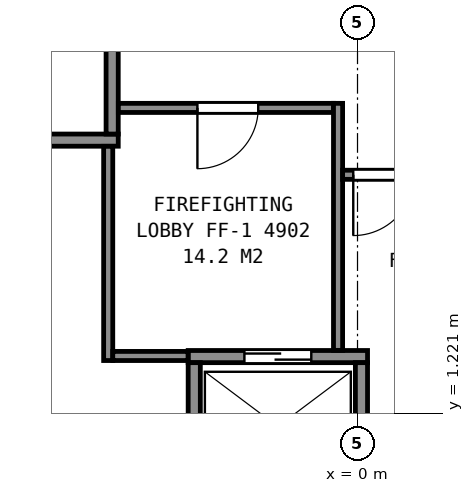
"""IFC4 building model, lengths in metres.
Left out: names, types, materials, properties, quantities, classifications, styles, units other than length and angle.
Written with IfcOpenShell. Run it as: python <this file> out.ifc"""

import sys

from ifc_helpers import new_model, si_unit, direction, frame, frame_2d, origin, place, context, subcontext, project, spatial, rectangle, extrude, element, fill, save


model = new_model("IFC4")
c1 = context("Model", 3, precision=1e-05, world=origin(), true_north=direction((0.0, 1.0)))
c2 = subcontext(c1, "Body", "Model", "MODEL_VIEW")
j1 = project(units=[si_unit("LENGTHUNIT", "METRE"), si_unit("PLANEANGLEUNIT", "RADIAN")], contexts=[c1])
p1 = place(None, origin())
s1 = spatial("IfcSite", under=j1, at=p1, CompositionType="ELEMENT")
p2 = place(p1, origin())
s2 = spatial("IfcBuilding", under=s1, at=p2, CompositionType="ELEMENT")
p3 = place(p2, frame((0.0, 0.0, 196.9)))
s3 = spatial("IfcBuildingStorey", under=s2, at=p3, CompositionType="ELEMENT", Elevation=196.9)
p4 = place(p3, frame((-2.785, 2.15, 0.0), z_axis=(0.0, 0.0, 1.0), x_axis=(1.0, 0.0, 0.0)))
e1 = element("IfcWall", 1, at=p4, inside=s3, PredefinedType="PARTITIONING", context=c2, shape_type="SweptSolid", body=[
    extrude(rectangle(XDim=2.95, YDim=0.2, at=frame_2d((1.475, 0.0))), origin(), (0.0, 0.0, 1.0), 3.7),
])
p5 = place(p4, frame((0.925, 0.0, 0.0)))
e2 = element("IfcOpeningElement", 2, at=p5, cuts=e1, PredefinedType="OPENING", context=c2, shape_type="SweptSolid", body=[
    extrude(rectangle(XDim=1.1, YDim=2.1, at=frame_2d((0.55, 1.05))), frame((0.0, 0.11, 0.0), z_axis=(0.0, -1.0, 0.0), x_axis=(1.0, 0.0, 0.0)), (0.0, 0.0, 1.0), 0.22),
])
p6 = place(p3, frame((-6.285, 5.71, 0.0), z_axis=(0.0, 0.0, 1.0), x_axis=(1.0, 0.0, 0.0)))
e3 = element("IfcWall", 3, at=p6, inside=s3, PredefinedType="PARTITIONING", context=c2, shape_type="SweptSolid", body=[
    extrude(rectangle(XDim=2.35, YDim=0.2, at=frame_2d((1.175, 0.0))), origin(), (0.0, 0.0, 1.0), 3.7),
])
for number, where, z_axis, x_axis in (
    (4, (0.065, 0.1, 0.0), (0.0, 0.0, 1.0), (0.0, 1.0, 0.0)),
    (5, (-2.685, 0.1, 0.0), (0.0, 0.0, 1.0), (0.0, 1.0, 0.0)),
):
    element("IfcWall", number, at=place(p3, frame(where, z_axis=z_axis, x_axis=x_axis)), inside=s3, PredefinedType="PARTITIONING", context=c2, shape_type="SweptSolid", body=[
        extrude(rectangle(XDim=1.95, YDim=0.2, at=frame_2d((0.975, 0.0))), origin(), (0.0, 0.0, 1.0), 3.7),
    ])
p7 = place(p3, frame((-4.035, 5.81, 0.0), z_axis=(0.0, 0.0, 1.0), x_axis=(0.0, 1.0, 0.0)))
e6 = element("IfcWall", 6, at=p7, inside=s3, PredefinedType="PARTITIONING", context=c2, shape_type="SweptSolid", body=[
    extrude(rectangle(XDim=1.75, YDim=0.2, at=frame_2d((0.875, 0.0))), origin(), (0.0, 0.0, 1.0), 3.7),
])
p8 = place(p3, frame((-4.1, 2.085, 0.0), z_axis=(0.0, 0.0, 1.0), x_axis=(0.0, 1.0, 0.0)))
e7 = element("IfcWall", 7, at=p8, inside=s3, PredefinedType="PARTITIONING", context=c2, shape_type="SweptSolid", body=[
    extrude(rectangle(XDim=3.523, YDim=0.15, at=frame_2d((1.761, 0.0))), origin(), (0.0, 0.0, 1.0), 3.45),
])
p9 = place(p3, frame((-4.025, 2.16, 0.0), z_axis=(0.0, 0.0, 1.0), x_axis=(1.0, 0.0, 0.0)))
e8 = element("IfcWall", 8, at=p9, inside=s3, PredefinedType="PARTITIONING", context=c2, shape_type="SweptSolid", body=[
    extrude(rectangle(XDim=1.238, YDim=0.15, at=frame_2d((0.619, 0.0))), origin(), (0.0, 0.0, 1.0), 3.45),
])
p10 = place(p3, frame((-3.933, 6.24, 0.0), z_axis=(0.0, 0.0, 1.0), x_axis=(1.0, 0.0, 0.0)))
e9 = element("IfcWall", 9, at=p10, inside=s3, PredefinedType="PARTITIONING", context=c2, shape_type="SweptSolid", body=[
    extrude(rectangle(XDim=3.538, YDim=0.15, at=frame_2d((1.769, 0.0))), origin(), (0.0, 0.0, 1.0), 3.45),
])
p11 = place(p10, frame((1.3, 0.0, 0.0)))
e10 = element("IfcOpeningElement", 10, at=p11, cuts=e9, PredefinedType="OPENING", context=c2, shape_type="SweptSolid", body=[
    extrude(rectangle(XDim=1.0, YDim=2.1, at=frame_2d((0.5, 1.05))), frame((0.0, 0.085, 0.0), z_axis=(0.0, -1.0, 0.0), x_axis=(1.0, 0.0, 0.0)), (0.0, 0.0, 1.0), 0.17),
])
p12 = place(p3, frame((-0.32, 2.252, 0.0), z_axis=(0.0, 0.0, 1.0), x_axis=(0.0, 1.0, 0.0)))
e11 = element("IfcWall", 11, at=p12, inside=s3, PredefinedType="PARTITIONING", context=c2, shape_type="SweptSolid", body=[
    extrude(rectangle(XDim=4.063, YDim=0.15, at=frame_2d((2.031, 0.0))), origin(), (0.0, 0.0, 1.0), 3.45),
])
p13 = place(p3, frame((-0.245, 5.14, 0.0), z_axis=(0.0, 0.0, 1.0), x_axis=(1.0, 0.0, 0.0)))
e12 = element("IfcWall", 12, at=p13, inside=s3, PredefinedType="PARTITIONING", context=c2, shape_type="SweptSolid", body=[
    extrude(rectangle(XDim=5.11, YDim=0.15, at=frame_2d((2.555, 0.0))), origin(), (0.0, 0.0, 1.0), 3.45),
])
p14 = place(p13, frame((0.175, 0.0, 0.0)))
e13 = element("IfcOpeningElement", 13, at=p14, cuts=e12, PredefinedType="OPENING", context=c2, shape_type="SweptSolid", body=[
    extrude(rectangle(XDim=1.0, YDim=2.1, at=frame_2d((0.5, 1.05))), frame((0.0, 0.085, 0.0), z_axis=(0.0, -1.0, 0.0), x_axis=(1.0, 0.0, 0.0)), (0.0, 0.0, 1.0), 0.17),
])
p15 = place(p3, frame((-4.075, -12.545, 0.0), z_axis=(0.0, 0.0, 1.0), x_axis=(-0.499999743747, 0.866025551732, 0.0)))
e14 = element("IfcWall", 14, at=p15, inside=s3, PredefinedType="PARTITIONING", context=c2, shape_type="SweptSolid", body=[
    extrude(rectangle(XDim=17.656, YDim=0.2, at=frame_2d((8.828, 0.0))), origin(), (0.0, 0.0, 1.0), 2.362),
])
p16 = place(p15, frame((10.83, 0.0, 0.0)))
e15 = element("IfcOpeningElement", 15, at=p16, cuts=e14, PredefinedType="OPENING", context=c2, shape_type="SweptSolid", body=[
    extrude(rectangle(XDim=0.9, YDim=2.1, at=frame_2d((0.45, 1.05))), frame((0.0, 0.11, 0.0), z_axis=(0.0, -1.0, 0.0), x_axis=(1.0, 0.0, 0.0)), (0.0, 0.0, 1.0), 0.22),
])
p17 = place(p15, frame((7.148, 0.0, 0.0)))
e16 = element("IfcOpeningElement", 16, at=p17, cuts=e14, PredefinedType="OPENING", context=c2, shape_type="SweptSolid", body=[
    extrude(rectangle(XDim=0.9, YDim=2.1, at=frame_2d((0.45, 1.05))), frame((0.0, 0.11, 0.0), z_axis=(0.0, -1.0, 0.0), x_axis=(1.0, 0.0, 0.0)), (0.0, 0.0, 1.0), 0.22),
])
p18 = place(p15, frame((2.198, 0.0, 0.0)))
e17 = element("IfcOpeningElement", 17, at=p18, cuts=e14, PredefinedType="OPENING", context=c2, shape_type="SweptSolid", body=[
    extrude(rectangle(XDim=0.9, YDim=2.1, at=frame_2d((0.45, 1.05))), frame((0.0, 0.11, 0.0), z_axis=(0.0, -1.0, 0.0), x_axis=(1.0, 0.0, 0.0)), (0.0, 0.0, 1.0), 0.22),
])
p19 = place(p5, origin())
e18 = element("IfcDoor", 18, at=p19, inside=s3, OperationType="SLIDING_TO_LEFT", PredefinedType="DOOR", context=c2, shape_type="SweptSolid", body=[
    extrude(rectangle(XDim=1.1, YDim=2.1, at=frame_2d((0.55, 1.05))), frame((0.0, 0.025, 0.0), z_axis=(0.0, -1.0, 0.0), x_axis=(1.0, 0.0, 0.0)), (0.0, 0.0, 1.0), 0.05),
])
fill(e2, e18)
p20 = place(p11, origin())
e19 = element("IfcDoor", 19, at=p20, inside=s3, OperationType="SINGLE_SWING_LEFT", PredefinedType="DOOR", context=c2, shape_type="SweptSolid", body=[
    extrude(rectangle(XDim=1.0, YDim=2.1, at=frame_2d((0.5, 1.05))), frame((0.0, 0.025, 0.0), z_axis=(0.0, -1.0, 0.0), x_axis=(1.0, 0.0, 0.0)), (0.0, 0.0, 1.0), 0.05),
])
fill(e10, e19)
p21 = place(p14, origin())
e20 = element("IfcDoor", 20, at=p21, inside=s3, OperationType="SINGLE_SWING_LEFT", PredefinedType="DOOR", context=c2, shape_type="SweptSolid", body=[
    extrude(rectangle(XDim=1.0, YDim=2.1, at=frame_2d((0.5, 1.05))), frame((0.0, 0.025, 0.0), z_axis=(0.0, -1.0, 0.0), x_axis=(1.0, 0.0, 0.0)), (0.0, 0.0, 1.0), 0.05),
])
fill(e13, e20)
save(model, sys.argv[1])
